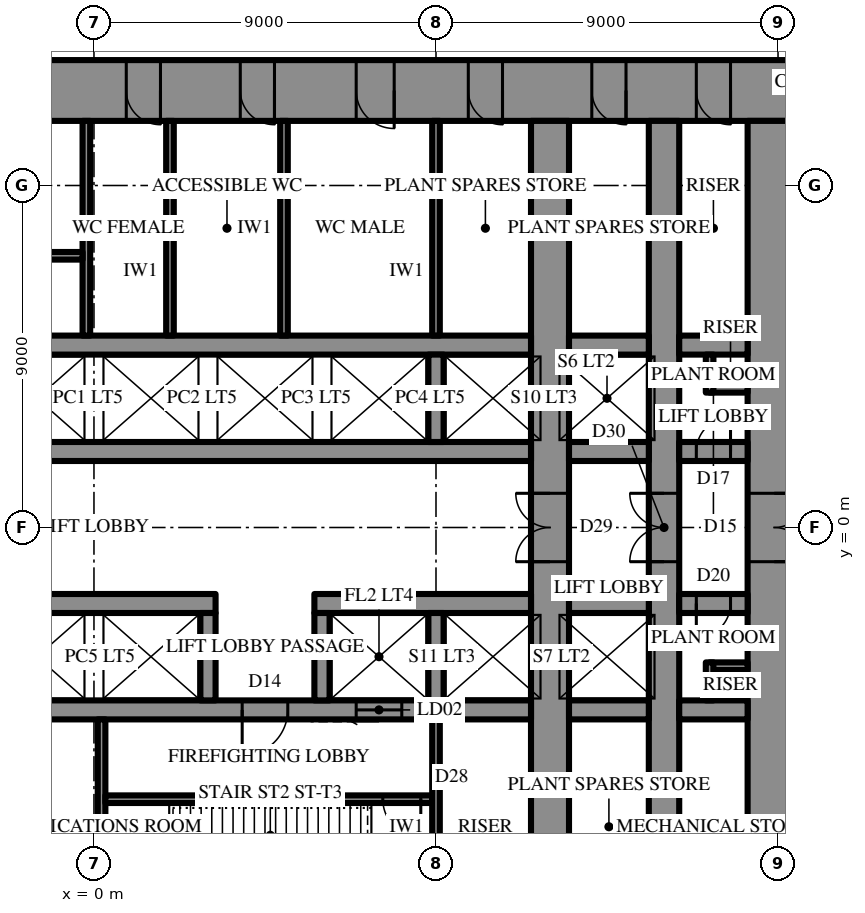
"""IFC4 building model, lengths in metres.
Left out: names, types, materials, properties, quantities, classifications, styles, units other than length and angle.
Written with IfcOpenShell. Run it as: python <this file> out.ifc"""

import sys

from ifc_helpers import new_model, si_unit, direction, frame, frame_2d, origin, place, context, subcontext, project, spatial, rectangle, extrude, element, fill, save


model = new_model("IFC4")
c1 = context("Model", 3, precision=1e-05, world=origin(), true_north=direction((0.0, 1.0)))
c2 = subcontext(c1, "Body", "Model", "MODEL_VIEW")
j1 = project(units=[si_unit("LENGTHUNIT", "METRE"), si_unit("PLANEANGLEUNIT", "RADIAN")], contexts=[c1])
p1 = place(None, origin())
s1 = spatial("IfcSite", under=j1, at=p1, CompositionType="ELEMENT")
p2 = place(p1, origin())
s2 = spatial("IfcBuilding", under=s1, at=p2, CompositionType="ELEMENT")
p3 = place(p2, frame((0.0, 0.0, 203.5)))
s3 = spatial("IfcBuildingStorey", under=s2, at=p3, CompositionType="ELEMENT", Elevation=203.5)
p4 = place(p3, frame((-18.6, 11.5, 0.0), z_axis=(0.0, 0.0, 1.0), x_axis=(1.0, 0.0, 0.0)))
e1 = element("IfcWall", 1, at=p4, inside=s3, PredefinedType="SHEAR", context=c2, shape_type="SweptSolid", body=[
    extrude(rectangle(XDim=37.2, YDim=1.6, at=frame_2d((18.6, 0.0))), origin(), (0.0, 0.0, 1.0), 7.0),
])
p5 = place(p4, frame((19.45, 0.0, 0.0)))
e2 = element("IfcOpeningElement", 2, at=p5, cuts=e1, PredefinedType="OPENING", context=c2, shape_type="SweptSolid", body=[
    extrude(rectangle(XDim=0.9, YDim=2.2, at=frame_2d((0.45, 1.1))), frame((0.0, 0.81, 0.0), z_axis=(0.0, -1.0, 0.0), x_axis=(1.0, 0.0, 0.0)), (0.0, 0.0, 1.0), 1.62),
])
p6 = place(p4, frame((22.45, 0.0, 0.0)))
e3 = element("IfcOpeningElement", 3, at=p6, cuts=e1, PredefinedType="OPENING", context=c2, shape_type="SweptSolid", body=[
    extrude(rectangle(XDim=0.9, YDim=2.2, at=frame_2d((0.45, 1.1))), frame((0.0, 0.81, 0.0), z_axis=(0.0, -1.0, 0.0), x_axis=(1.0, 0.0, 0.0)), (0.0, 0.0, 1.0), 1.62),
])
p7 = place(p4, frame((25.5, 0.0, 0.0)))
e4 = element("IfcOpeningElement", 4, at=p7, cuts=e1, PredefinedType="OPENING", context=c2, shape_type="SweptSolid", body=[
    extrude(rectangle(XDim=1.0, YDim=2.2, at=frame_2d((0.5, 1.1))), frame((0.0, 0.81, 0.0), z_axis=(0.0, -1.0, 0.0), x_axis=(1.0, 0.0, 0.0)), (0.0, 0.0, 1.0), 1.62),
])
p8 = place(p4, frame((1.85, 0.0, 0.0)))
e5 = element("IfcOpeningElement", 5, at=p8, cuts=e1, PredefinedType="OPENING", context=c2, shape_type="SweptSolid", body=[
    extrude(rectangle(XDim=0.9, YDim=2.2, at=frame_2d((0.45, 1.1))), frame((0.0, 0.81, 0.0), z_axis=(0.0, -1.0, 0.0), x_axis=(1.0, 0.0, 0.0)), (0.0, 0.0, 1.0), 1.62),
])
p9 = place(p4, frame((4.6, 0.0, 0.0)))
e6 = element("IfcOpeningElement", 6, at=p9, cuts=e1, PredefinedType="OPENING", context=c2, shape_type="SweptSolid", body=[
    extrude(rectangle(XDim=0.9, YDim=2.2, at=frame_2d((0.45, 1.1))), frame((0.0, 0.81, 0.0), z_axis=(0.0, -1.0, 0.0), x_axis=(1.0, 0.0, 0.0)), (0.0, 0.0, 1.0), 1.62),
])
p10 = place(p4, frame((7.85, 0.0, 0.0)))
e7 = element("IfcOpeningElement", 7, at=p10, cuts=e1, PredefinedType="OPENING", context=c2, shape_type="SweptSolid", body=[
    extrude(rectangle(XDim=0.9, YDim=2.2, at=frame_2d((0.45, 1.1))), frame((0.0, 0.81, 0.0), z_axis=(0.0, -1.0, 0.0), x_axis=(1.0, 0.0, 0.0)), (0.0, 0.0, 1.0), 1.62),
])
p11 = place(p4, frame((28.45, 0.0, 0.0)))
e8 = element("IfcOpeningElement", 8, at=p11, cuts=e1, PredefinedType="OPENING", context=c2, shape_type="SweptSolid", body=[
    extrude(rectangle(XDim=0.9, YDim=2.2, at=frame_2d((0.45, 1.1))), frame((0.0, 0.81, 0.0), z_axis=(0.0, -1.0, 0.0), x_axis=(1.0, 0.0, 0.0)), (0.0, 0.0, 1.0), 1.62),
])
p12 = place(p4, frame((31.7, 0.0, 0.0)))
e9 = element("IfcOpeningElement", 9, at=p12, cuts=e1, PredefinedType="OPENING", context=c2, shape_type="SweptSolid", body=[
    extrude(rectangle(XDim=0.9, YDim=2.2, at=frame_2d((0.45, 1.1))), frame((0.0, 0.81, 0.0), z_axis=(0.0, -1.0, 0.0), x_axis=(1.0, 0.0, 0.0)), (0.0, 0.0, 1.0), 1.62),
])
p13 = place(p4, frame((34.45, 0.0, 0.0)))
e10 = element("IfcOpeningElement", 10, at=p13, cuts=e1, PredefinedType="OPENING", context=c2, shape_type="SweptSolid", body=[
    extrude(rectangle(XDim=0.9, YDim=2.2, at=frame_2d((0.45, 1.1))), frame((0.0, 0.81, 0.0), z_axis=(0.0, -1.0, 0.0), x_axis=(1.0, 0.0, 0.0)), (0.0, 0.0, 1.0), 1.62),
])
p14 = place(p3, frame((17.9, -10.7, 0.0), z_axis=(0.0, 0.0, 1.0), x_axis=(0.0, 1.0, 0.0)))
e11 = element("IfcWall", 11, at=p14, inside=s3, PredefinedType="SHEAR", context=c2, shape_type="SweptSolid", body=[
    extrude(rectangle(XDim=21.4, YDim=1.4, at=frame_2d((10.7, 0.0))), origin(), (0.0, 0.0, 1.0), 7.0),
])
p15 = place(p14, frame((9.8, 0.0, 0.0)))
e12 = element("IfcOpeningElement", 12, at=p15, cuts=e11, PredefinedType="OPENING", context=c2, shape_type="SweptSolid", body=[
    extrude(rectangle(XDim=1.8, YDim=2.4, at=frame_2d((0.9, 1.2))), frame((0.0, 0.71, 0.0), z_axis=(0.0, -1.0, 0.0), x_axis=(1.0, 0.0, 0.0)), (0.0, 0.0, 1.0), 1.42),
])
p16 = place(p3, frame((12.0, -10.7, 0.0), z_axis=(0.0, 0.0, 1.0), x_axis=(0.0, 1.0, 0.0)))
e13 = element("IfcWall", 13, at=p16, inside=s3, PredefinedType="SHEAR", context=c2, shape_type="SweptSolid", body=[
    extrude(rectangle(XDim=21.4, YDim=1.0, at=frame_2d((10.7, 0.0))), origin(), (0.0, 0.0, 1.0), 7.0),
])
p17 = place(p16, frame((9.8, 0.0, 0.0)))
e14 = element("IfcOpeningElement", 14, at=p17, cuts=e13, PredefinedType="OPENING", context=c2, shape_type="SweptSolid", body=[
    extrude(rectangle(XDim=1.8, YDim=2.4, at=frame_2d((0.9, 1.2))), frame((0.0, 0.51, 0.0), z_axis=(0.0, -1.0, 0.0), x_axis=(1.0, 0.0, 0.0)), (0.0, 0.0, 1.0), 1.02),
])
p18 = place(p3, frame((15.0, -10.7, 0.0), z_axis=(0.0, 0.0, 1.0), x_axis=(0.0, 1.0, 0.0)))
e15 = element("IfcWall", 15, at=p18, inside=s3, PredefinedType="SHEAR", context=c2, shape_type="SweptSolid", body=[
    extrude(rectangle(XDim=21.4, YDim=0.8, at=frame_2d((10.7, 0.0))), origin(), (0.0, 0.0, 1.0), 7.0),
])
p19 = place(p18, frame((9.8, 0.0, 0.0)))
e16 = element("IfcOpeningElement", 16, at=p19, cuts=e15, PredefinedType="OPENING", context=c2, shape_type="SweptSolid", body=[
    extrude(rectangle(XDim=1.8, YDim=2.4, at=frame_2d((0.9, 1.2))), frame((0.0, 0.41, 0.0), z_axis=(0.0, -1.0, 0.0), x_axis=(1.0, 0.0, 0.0)), (0.0, 0.0, 1.0), 0.82),
])
p20 = place(p3, frame((-3.2, 2.0, 0.0), z_axis=(0.0, 0.0, 1.0), x_axis=(1.0, 0.0, 0.0)))
e17 = element("IfcWall", 17, at=p20, inside=s3, PredefinedType="SHEAR", context=c2, shape_type="SweptSolid", body=[
    extrude(rectangle(XDim=14.7, YDim=0.5, at=frame_2d((7.35, 0.0))), origin(), (0.0, 0.0, 1.0), 7.0),
])
p21 = place(p3, frame((12.5, 2.0, 0.0), z_axis=(0.0, 0.0, 1.0), x_axis=(1.0, 0.0, 0.0)))
e18 = element("IfcWall", 18, at=p21, inside=s3, PredefinedType="SHEAR", context=c2, shape_type="SweptSolid", body=[
    extrude(rectangle(XDim=2.1, YDim=0.5, at=frame_2d((1.05, 0.0))), origin(), (0.0, 0.0, 1.0), 7.0),
])
p22 = place(p3, frame((15.4, 2.0, 0.0), z_axis=(0.0, 0.0, 1.0), x_axis=(1.0, 0.0, 0.0)))
e19 = element("IfcWall", 19, at=p22, inside=s3, PredefinedType="SHEAR", context=c2, shape_type="SweptSolid", body=[
    extrude(rectangle(XDim=1.8, YDim=0.5, at=frame_2d((0.9, 0.0))), origin(), (0.0, 0.0, 1.0), 7.0),
])
p23 = place(p22, frame((0.45, 0.0, 0.0)))
e20 = element("IfcOpeningElement", 20, at=p23, cuts=e19, PredefinedType="OPENING", context=c2, shape_type="SweptSolid", body=[
    extrude(rectangle(XDim=0.9, YDim=2.2, at=frame_2d((0.45, 1.1))), frame((0.0, 0.26, 0.0), z_axis=(0.0, -1.0, 0.0), x_axis=(1.0, 0.0, 0.0)), (0.0, 0.0, 1.0), 0.52),
])
p24 = place(p3, frame((-11.5, 4.8, 0.0), z_axis=(0.0, 0.0, 1.0), x_axis=(1.0, 0.0, 0.0)))
e21 = element("IfcWall", 21, at=p24, inside=s3, PredefinedType="SHEAR", context=c2, shape_type="SweptSolid", body=[
    extrude(rectangle(XDim=23.0, YDim=0.5, at=frame_2d((11.5, 0.0))), origin(), (0.0, 0.0, 1.0), 7.0),
])
p25 = place(p24, frame((6.4, 0.0, 0.0)))
e22 = element("IfcOpeningElement", 22, at=p25, cuts=e21, PredefinedType="OPENING", context=c2, shape_type="SweptSolid", body=[
    extrude(rectangle(XDim=1.2, YDim=2.2, at=frame_2d((0.6, 1.1))), frame((0.0, 0.26, 0.0), z_axis=(0.0, -1.0, 0.0), x_axis=(1.0, 0.0, 0.0)), (0.0, 0.0, 1.0), 0.52),
])
p26 = place(p24, frame((3.4, 0.0, 0.0)))
e23 = element("IfcOpeningElement", 23, at=p26, cuts=e21, PredefinedType="OPENING", context=c2, shape_type="SweptSolid", body=[
    extrude(rectangle(XDim=1.2, YDim=2.2, at=frame_2d((0.6, 1.1))), frame((0.0, 0.26, 0.0), z_axis=(0.0, -1.0, 0.0), x_axis=(1.0, 0.0, 0.0)), (0.0, 0.0, 1.0), 0.52),
])
p27 = place(p3, frame((12.5, 4.8, 0.0), z_axis=(0.0, 0.0, 1.0), x_axis=(1.0, 0.0, 0.0)))
e24 = element("IfcWall", 24, at=p27, inside=s3, PredefinedType="SHEAR", context=c2, shape_type="SweptSolid", body=[
    extrude(rectangle(XDim=2.1, YDim=0.5, at=frame_2d((1.05, 0.0))), origin(), (0.0, 0.0, 1.0), 7.0),
])
p28 = place(p3, frame((15.4, 4.8, 0.0), z_axis=(0.0, 0.0, 1.0), x_axis=(1.0, 0.0, 0.0)))
e25 = element("IfcWall", 25, at=p28, inside=s3, PredefinedType="SHEAR", context=c2, shape_type="SweptSolid", body=[
    extrude(rectangle(XDim=1.8, YDim=0.5, at=frame_2d((0.9, 0.0))), origin(), (0.0, 0.0, 1.0), 7.0),
])
p29 = place(p3, frame((9.0, 2.25, 0.0), z_axis=(0.0, 0.0, 1.0), x_axis=(0.0, 1.0, 0.0)))
e26 = element("IfcWall", 26, at=p29, inside=s3, PredefinedType="SHEAR", context=c2, shape_type="SweptSolid", body=[
    extrude(rectangle(XDim=2.3, YDim=0.4, at=frame_2d((1.15, 0.0))), origin(), (0.0, 0.0, 1.0), 7.0),
])
p30 = place(p3, frame((-0.2, 5.05, 0.0), z_axis=(0.0, 0.0, 1.0), x_axis=(0.0, 1.0, 0.0)))
e27 = element("IfcWall", 27, at=p30, inside=s3, PredefinedType="SHEAR", context=c2, shape_type="SweptSolid", body=[
    extrude(rectangle(XDim=5.65, YDim=0.2, at=frame_2d((2.825, 0.0))), origin(), (0.0, 0.0, 1.0), 7.0),
])
p31 = place(p3, frame((-8.9, 7.15, 0.0), z_axis=(0.0, 0.0, 1.0), x_axis=(1.0, 0.0, 0.0)))
e28 = element("IfcWall", 28, at=p31, inside=s3, PredefinedType="SHEAR", context=c2, shape_type="SweptSolid", body=[
    extrude(rectangle(XDim=8.6, YDim=0.2, at=frame_2d((4.3, 0.0))), origin(), (0.0, 0.0, 1.0), 7.0),
])
p32 = place(p31, frame((0.3, 0.0, 0.0)))
e29 = element("IfcOpeningElement", 29, at=p32, cuts=e28, PredefinedType="OPENING", context=c2, shape_type="SweptSolid", body=[
    extrude(rectangle(XDim=1.0, YDim=2.2, at=frame_2d((0.5, 1.1))), frame((0.0, 0.11, 0.0), z_axis=(0.0, -1.0, 0.0), x_axis=(1.0, 0.0, 0.0)), (0.0, 0.0, 1.0), 0.22),
])
p33 = place(p3, frame((17.2, -2.0, 0.0), z_axis=(0.0, 0.0, 1.0), x_axis=(-1.0, 0.0, 0.0)))
e30 = element("IfcWall", 30, at=p33, inside=s3, PredefinedType="SHEAR", context=c2, shape_type="SweptSolid", body=[
    extrude(rectangle(XDim=1.8, YDim=0.5, at=frame_2d((0.9, 0.0))), origin(), (0.0, 0.0, 1.0), 7.0),
])
p34 = place(p33, frame((0.45, 0.0, 0.0)))
e31 = element("IfcOpeningElement", 31, at=p34, cuts=e30, PredefinedType="OPENING", context=c2, shape_type="SweptSolid", body=[
    extrude(rectangle(XDim=0.9, YDim=2.2, at=frame_2d((0.45, 1.1))), frame((0.0, 0.26, 0.0), z_axis=(0.0, -1.0, 0.0), x_axis=(1.0, 0.0, 0.0)), (0.0, 0.0, 1.0), 0.52),
])
p35 = place(p3, frame((14.6, -2.0, 0.0), z_axis=(0.0, 0.0, 1.0), x_axis=(-1.0, 0.0, 0.0)))
e32 = element("IfcWall", 32, at=p35, inside=s3, PredefinedType="SHEAR", context=c2, shape_type="SweptSolid", body=[
    extrude(rectangle(XDim=2.1, YDim=0.5, at=frame_2d((1.05, 0.0))), origin(), (0.0, 0.0, 1.0), 7.0),
])
p36 = place(p3, frame((11.5, -2.0, 0.0), z_axis=(0.0, 0.0, 1.0), x_axis=(-1.0, 0.0, 0.0)))
e33 = element("IfcWall", 33, at=p36, inside=s3, PredefinedType="SHEAR", context=c2, shape_type="SweptSolid", body=[
    extrude(rectangle(XDim=5.7, YDim=0.5, at=frame_2d((2.85, 0.0))), origin(), (0.0, 0.0, 1.0), 7.0),
])
p37 = place(p3, frame((3.2, -2.0, 0.0), z_axis=(0.0, 0.0, 1.0), x_axis=(-1.0, 0.0, 0.0)))
e34 = element("IfcWall", 34, at=p37, inside=s3, PredefinedType="SHEAR", context=c2, shape_type="SweptSolid", body=[
    extrude(rectangle(XDim=14.7, YDim=0.5, at=frame_2d((7.35, 0.0))), origin(), (0.0, 0.0, 1.0), 7.0),
])
p38 = place(p3, frame((17.2, -4.8, 0.0), z_axis=(0.0, 0.0, 1.0), x_axis=(-1.0, 0.0, 0.0)))
e35 = element("IfcWall", 35, at=p38, inside=s3, PredefinedType="SHEAR", context=c2, shape_type="SweptSolid", body=[
    extrude(rectangle(XDim=1.8, YDim=0.5, at=frame_2d((0.9, 0.0))), origin(), (0.0, 0.0, 1.0), 7.0),
])
p39 = place(p3, frame((14.6, -4.8, 0.0), z_axis=(0.0, 0.0, 1.0), x_axis=(-1.0, 0.0, 0.0)))
e36 = element("IfcWall", 36, at=p39, inside=s3, PredefinedType="SHEAR", context=c2, shape_type="SweptSolid", body=[
    extrude(rectangle(XDim=2.1, YDim=0.5, at=frame_2d((1.05, 0.0))), origin(), (0.0, 0.0, 1.0), 7.0),
])
p40 = place(p3, frame((11.5, -4.8, 0.0), z_axis=(0.0, 0.0, 1.0), x_axis=(-1.0, 0.0, 0.0)))
e37 = element("IfcWall", 37, at=p40, inside=s3, PredefinedType="SHEAR", context=c2, shape_type="SweptSolid", body=[
    extrude(rectangle(XDim=23.0, YDim=0.5, at=frame_2d((11.5, 0.0))), origin(), (0.0, 0.0, 1.0), 7.0),
])
p41 = place(p40, frame((6.4, 0.0, 0.0)))
e38 = element("IfcOpeningElement", 38, at=p41, cuts=e37, PredefinedType="OPENING", context=c2, shape_type="SweptSolid", body=[
    extrude(rectangle(XDim=1.2, YDim=2.2, at=frame_2d((0.6, 1.1))), frame((0.0, 0.26, 0.0), z_axis=(0.0, -1.0, 0.0), x_axis=(1.0, 0.0, 0.0)), (0.0, 0.0, 1.0), 0.52),
])
p42 = place(p40, frame((3.4, 0.0, 0.0)))
e39 = element("IfcOpeningElement", 39, at=p42, cuts=e37, PredefinedType="OPENING", context=c2, shape_type="SweptSolid", body=[
    extrude(rectangle(XDim=1.2, YDim=2.2, at=frame_2d((0.6, 1.1))), frame((0.0, 0.26, 0.0), z_axis=(0.0, -1.0, 0.0), x_axis=(1.0, 0.0, 0.0)), (0.0, 0.0, 1.0), 0.52),
])
for number, where, z_axis, x_axis in (
    (40, (9.0, -2.25, 0.0), (0.0, 0.0, 1.0), (0.0, -1.0, 0.0)),
    (41, (6.0, -2.25, 0.0), (0.0, 0.0, 1.0), (0.0, -1.0, 0.0)),
    (42, (3.0, -2.25, 0.0), (0.0, 0.0, 1.0), (0.0, -1.0, 0.0)),
):
    element("IfcWall", number, at=place(p3, frame(where, z_axis=z_axis, x_axis=x_axis)), inside=s3, PredefinedType="SHEAR", context=c2, shape_type="SweptSolid", body=[
        extrude(rectangle(XDim=2.3, YDim=0.4, at=frame_2d((1.15, 0.0))), origin(), (0.0, 0.0, 1.0), 7.0),
    ])
p43 = place(p3, frame((0.2, -5.05, 0.0), z_axis=(0.0, 0.0, 1.0), x_axis=(0.0, -1.0, 0.0)))
e43 = element("IfcWall", 43, at=p43, inside=s3, PredefinedType="SHEAR", context=c2, shape_type="SweptSolid", body=[
    extrude(rectangle(XDim=5.65, YDim=0.2, at=frame_2d((2.825, 0.0))), origin(), (0.0, 0.0, 1.0), 7.0),
])
p44 = place(p3, frame((8.9, -7.15, 0.0), z_axis=(0.0, 0.0, 1.0), x_axis=(-1.0, 0.0, 0.0)))
e44 = element("IfcWall", 44, at=p44, inside=s3, PredefinedType="SHEAR", context=c2, shape_type="SweptSolid", body=[
    extrude(rectangle(XDim=8.6, YDim=0.2, at=frame_2d((4.3, 0.0))), origin(), (0.0, 0.0, 1.0), 7.0),
])
p45 = place(p44, frame((0.3, 0.0, 0.0)))
e45 = element("IfcOpeningElement", 45, at=p45, cuts=e44, PredefinedType="OPENING", context=c2, shape_type="SweptSolid", body=[
    extrude(rectangle(XDim=1.0, YDim=2.2, at=frame_2d((0.5, 1.1))), frame((0.0, 0.11, 0.0), z_axis=(0.0, -1.0, 0.0), x_axis=(1.0, 0.0, 0.0)), (0.0, 0.0, 1.0), 0.22),
])
for number, where, z_axis, x_axis in (
    (46, (9.0, 5.05, 0.0), (0.0, 0.0, 1.0), (0.0, 1.0, 0.0)),
    (47, (2.0, 5.05, 0.0), (0.0, 0.0, 1.0), (0.0, 1.0, 0.0)),
    (48, (5.0, 5.05, 0.0), (0.0, 0.0, 1.0), (0.0, 1.0, 0.0)),
    (49, (9.0, -5.05, 0.0), (0.0, 0.0, 1.0), (0.0, -1.0, 0.0)),
):
    element("IfcWall", number, at=place(p3, frame(where, z_axis=z_axis, x_axis=x_axis)), inside=s3, PredefinedType="PARTITIONING", context=c2, shape_type="SweptSolid", body=[
        extrude(rectangle(XDim=5.65, YDim=0.2, at=frame_2d((2.825, 0.0))), origin(), (0.0, 0.0, 1.0), 6.7),
    ])
for number, where, z_axis, x_axis in (
    (50, (16.2, 3.65, 0.0), (0.0, 0.0, 1.0), (1.0, 0.0, 0.0)),
    (51, (16.2, 3.55, 0.0), (0.0, 0.0, 1.0), (0.0, 1.0, 0.0)),
    (52, (17.2, -3.65, 0.0), (0.0, 0.0, 1.0), (-1.0, 0.0, 0.0)),
    (53, (16.2, -3.55, 0.0), (0.0, 0.0, 1.0), (0.0, -1.0, 0.0)),
):
    element("IfcWall", number, at=place(p3, frame(where, z_axis=z_axis, x_axis=x_axis)), inside=s3, PredefinedType="PARTITIONING", context=c2, shape_type="SweptSolid", body=[
        extrude(rectangle(XDim=1.0, YDim=0.2, at=frame_2d((0.5, 0.0))), origin(), (0.0, 0.0, 1.0), 6.7),
    ])
p46 = place(p15, frame((1.8, 0.0, 0.0), z_axis=(0.0, 0.0, 1.0), x_axis=(-1.0, 0.0, 0.0)))
e54 = element("IfcDoor", 54, at=p46, inside=s3, OperationType="DOUBLE_DOOR_SINGLE_SWING", PredefinedType="DOOR", context=c2, shape_type="SweptSolid", body=[
    extrude(rectangle(XDim=1.8, YDim=2.4, at=frame_2d((0.9, 1.2))), frame((0.0, 0.025, 0.0), z_axis=(0.0, -1.0, 0.0), x_axis=(1.0, 0.0, 0.0)), (0.0, 0.0, 1.0), 0.05),
])
fill(e12, e54)
p47 = place(p5, frame((0.9, 0.0, 0.0), z_axis=(0.0, 0.0, 1.0), x_axis=(-1.0, 0.0, 0.0)))
e55 = element("IfcDoor", 55, at=p47, inside=s3, OperationType="SINGLE_SWING_RIGHT", PredefinedType="DOOR", context=c2, shape_type="SweptSolid", body=[
    extrude(rectangle(XDim=0.9, YDim=2.2, at=frame_2d((0.45, 1.1))), frame((0.0, 0.025, 0.0), z_axis=(0.0, -1.0, 0.0), x_axis=(1.0, 0.0, 0.0)), (0.0, 0.0, 1.0), 0.05),
])
fill(e2, e55)
p48 = place(p6, frame((0.9, 0.0, 0.0), z_axis=(0.0, 0.0, 1.0), x_axis=(-1.0, 0.0, 0.0)))
e56 = element("IfcDoor", 56, at=p48, inside=s3, OperationType="SINGLE_SWING_RIGHT", PredefinedType="DOOR", context=c2, shape_type="SweptSolid", body=[
    extrude(rectangle(XDim=0.9, YDim=2.2, at=frame_2d((0.45, 1.1))), frame((0.0, 0.025, 0.0), z_axis=(0.0, -1.0, 0.0), x_axis=(1.0, 0.0, 0.0)), (0.0, 0.0, 1.0), 0.05),
])
fill(e3, e56)
p49 = place(p7, frame((1.0, 0.0, 0.0), z_axis=(0.0, 0.0, 1.0), x_axis=(-1.0, 0.0, 0.0)))
e57 = element("IfcDoor", 57, at=p49, inside=s3, OperationType="SINGLE_SWING_RIGHT", PredefinedType="DOOR", context=c2, shape_type="SweptSolid", body=[
    extrude(rectangle(XDim=1.0, YDim=2.2, at=frame_2d((0.5, 1.1))), frame((0.0, 0.025, 0.0), z_axis=(0.0, -1.0, 0.0), x_axis=(1.0, 0.0, 0.0)), (0.0, 0.0, 1.0), 0.05),
])
fill(e4, e57)
p50 = place(p11, frame((0.9, 0.0, 0.0), z_axis=(0.0, 0.0, 1.0), x_axis=(-1.0, 0.0, 0.0)))
e58 = element("IfcDoor", 58, at=p50, inside=s3, OperationType="SINGLE_SWING_RIGHT", PredefinedType="DOOR", context=c2, shape_type="SweptSolid", body=[
    extrude(rectangle(XDim=0.9, YDim=2.2, at=frame_2d((0.45, 1.1))), frame((0.0, 0.025, 0.0), z_axis=(0.0, -1.0, 0.0), x_axis=(1.0, 0.0, 0.0)), (0.0, 0.0, 1.0), 0.05),
])
fill(e8, e58)
p51 = place(p12, frame((0.9, 0.0, 0.0), z_axis=(0.0, 0.0, 1.0), x_axis=(-1.0, 0.0, 0.0)))
e59 = element("IfcDoor", 59, at=p51, inside=s3, OperationType="SINGLE_SWING_RIGHT", PredefinedType="DOOR", context=c2, shape_type="SweptSolid", body=[
    extrude(rectangle(XDim=0.9, YDim=2.2, at=frame_2d((0.45, 1.1))), frame((0.0, 0.025, 0.0), z_axis=(0.0, -1.0, 0.0), x_axis=(1.0, 0.0, 0.0)), (0.0, 0.0, 1.0), 0.05),
])
fill(e9, e59)
p52 = place(p13, frame((0.9, 0.0, 0.0), z_axis=(0.0, 0.0, 1.0), x_axis=(-1.0, 0.0, 0.0)))
e60 = element("IfcDoor", 60, at=p52, inside=s3, OperationType="SINGLE_SWING_RIGHT", PredefinedType="DOOR", context=c2, shape_type="SweptSolid", body=[
    extrude(rectangle(XDim=0.9, YDim=2.2, at=frame_2d((0.45, 1.1))), frame((0.0, 0.025, 0.0), z_axis=(0.0, -1.0, 0.0), x_axis=(1.0, 0.0, 0.0)), (0.0, 0.0, 1.0), 0.05),
])
fill(e10, e60)
p53 = place(p41, origin())
e61 = element("IfcDoor", 61, at=p53, inside=s3, OperationType="SINGLE_SWING_LEFT", PredefinedType="DOOR", context=c2, shape_type="SweptSolid", body=[
    extrude(rectangle(XDim=1.2, YDim=2.2, at=frame_2d((0.6, 1.1))), frame((0.0, 0.025, 0.0), z_axis=(0.0, -1.0, 0.0), x_axis=(1.0, 0.0, 0.0)), (0.0, 0.0, 1.0), 0.05),
])
fill(e38, e61)
p54 = place(p45, origin())
e62 = element("IfcDoor", 62, at=p54, inside=s3, OperationType="SINGLE_SWING_RIGHT", PredefinedType="DOOR", context=c2, shape_type="SweptSolid", body=[
    extrude(rectangle(XDim=1.0, YDim=2.2, at=frame_2d((0.5, 1.1))), frame((0.0, 0.025, 0.0), z_axis=(0.0, -1.0, 0.0), x_axis=(1.0, 0.0, 0.0)), (0.0, 0.0, 1.0), 0.05),
])
fill(e45, e62)
p55 = place(p23, origin())
e63 = element("IfcDoor", 63, at=p55, inside=s3, OperationType="SINGLE_SWING_LEFT", PredefinedType="DOOR", context=c2, shape_type="SweptSolid", body=[
    extrude(rectangle(XDim=0.9, YDim=2.2, at=frame_2d((0.45, 1.1))), frame((0.0, 0.025, 0.0), z_axis=(0.0, -1.0, 0.0), x_axis=(1.0, 0.0, 0.0)), (0.0, 0.0, 1.0), 0.05),
])
fill(e20, e63)
p56 = place(p34, origin())
e64 = element("IfcDoor", 64, at=p56, inside=s3, OperationType="SINGLE_SWING_LEFT", PredefinedType="DOOR", context=c2, shape_type="SweptSolid", body=[
    extrude(rectangle(XDim=0.9, YDim=2.2, at=frame_2d((0.45, 1.1))), frame((0.0, 0.025, 0.0), z_axis=(0.0, -1.0, 0.0), x_axis=(1.0, 0.0, 0.0)), (0.0, 0.0, 1.0), 0.05),
])
fill(e31, e64)
p57 = place(p17, origin())
e65 = element("IfcDoor", 65, at=p57, inside=s3, OperationType="DOUBLE_DOOR_SINGLE_SWING", PredefinedType="DOOR", context=c2, shape_type="SweptSolid", body=[
    extrude(rectangle(XDim=1.8, YDim=2.4, at=frame_2d((0.9, 1.2))), frame((0.0, 0.025, 0.0), z_axis=(0.0, -1.0, 0.0), x_axis=(1.0, 0.0, 0.0)), (0.0, 0.0, 1.0), 0.05),
])
fill(e14, e65)
p58 = place(p19, origin())
e66 = element("IfcDoor", 66, at=p58, inside=s3, OperationType="DOUBLE_DOOR_SINGLE_SWING", PredefinedType="DOOR", context=c2, shape_type="SweptSolid", body=[
    extrude(rectangle(XDim=1.8, YDim=2.4, at=frame_2d((0.9, 1.2))), frame((0.0, 0.025, 0.0), z_axis=(0.0, -1.0, 0.0), x_axis=(1.0, 0.0, 0.0)), (0.0, 0.0, 1.0), 0.05),
])
fill(e16, e66)
p59 = place(p42, origin())
e67 = element("IfcDoor", 67, at=p59, inside=s3, OperationType="SLIDING_TO_LEFT", PredefinedType="DOOR", context=c2, shape_type="SweptSolid", body=[
    extrude(rectangle(XDim=1.2, YDim=2.2, at=frame_2d((0.6, 1.1))), frame((0.0, 0.025, 0.0), z_axis=(0.0, -1.0, 0.0), x_axis=(1.0, 0.0, 0.0)), (0.0, 0.0, 1.0), 0.05),
])
fill(e39, e67)
save(model, sys.argv[1])
